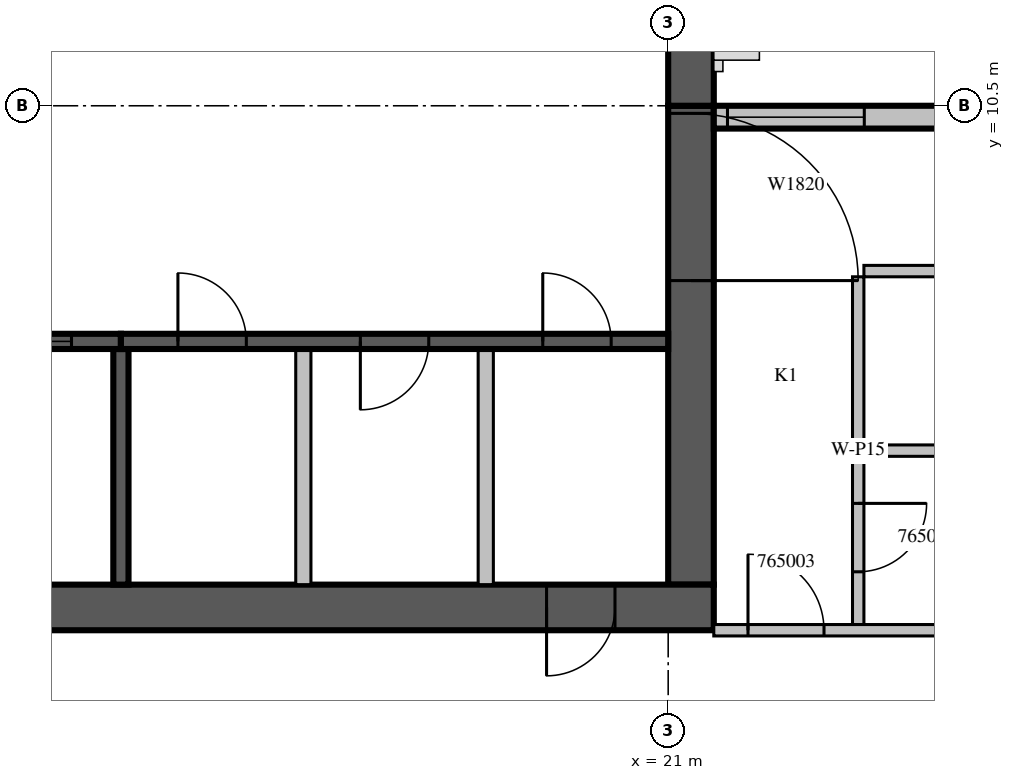
"""IFC4 building model, lengths in metres.
Left out: names, types, materials, properties, quantities, classifications, styles, units other than length and angle.
Written with IfcOpenShell. Run it as: python <this file> out.ifc"""

import sys

from ifc_helpers import new_model, si_unit, direction, frame, frame_2d, origin, place, context, subcontext, project, spatial, rectangle, extrude, source, transform, mapped, element, fill, save


model = new_model("IFC4")
c1 = context("Model", 3, precision=1e-05, world=origin(), true_north=direction((0.0, 1.0)))
c2 = subcontext(c1, "Body", "Model", "MODEL_VIEW")
j1 = project(units=[si_unit("LENGTHUNIT", "METRE"), si_unit("PLANEANGLEUNIT", "RADIAN")], contexts=[c1])
p1 = place(None, origin())
s1 = spatial("IfcSite", under=j1, at=p1, CompositionType="ELEMENT")
p2 = place(p1, origin())
s2 = spatial("IfcBuilding", under=s1, at=p2, CompositionType="ELEMENT")
p3 = place(p2, frame((0.0, 0.0, 288.0)))
s3 = spatial("IfcBuildingStorey", under=s2, at=p3, CompositionType="ELEMENT", Elevation=288.0)
m1 = source(origin(), c2, "Body", "SweptSolid", [
    extrude(rectangle(XDim=6.3, YDim=0.6, at=frame_2d((3.15, 0.0))), origin(), (0.0, 0.0, 1.0), 3.5),
])
p4 = place(p3, frame((21.3, 4.2, 0.0), z_axis=(0.0, 0.0, 1.0), x_axis=(0.0, 1.0, 0.0)))
e1 = element("IfcWall", 1, at=p4, inside=s3, PredefinedType="SHEAR", context=c2, shape_type="MappedRepresentation", body=[
    mapped(m1, transform((0.0, 0.0, 0.0), scale=1.0)),
])
m2 = source(origin(), c2, "Body", "SweptSolid", [
    extrude(rectangle(XDim=2.2, YDim=2.1, at=frame_2d((1.1, 1.05))), frame((0.0, 0.31, 0.0), z_axis=(0.0, -1.0, 0.0), x_axis=(1.0, 0.0, 0.0)), (0.0, 0.0, 1.0), 0.62),
])
p5 = place(p4, frame((4.0, 0.0, 0.0)))
e2 = element("IfcOpeningElement", 2, at=p5, cuts=e1, PredefinedType="OPENING", context=c2, shape_type="MappedRepresentation", body=[
    mapped(m2, transform((0.0, 0.0, 0.0), scale=1.0)),
])
m3 = source(origin(), c2, "Body", "SweptSolid", [
    extrude(rectangle(XDim=17.4, YDim=0.6, at=frame_2d((8.7, 0.0))), origin(), (0.0, 0.0, 1.0), 3.5),
])
p6 = place(p3, frame((4.2, 3.9, 0.0), z_axis=(0.0, 0.0, 1.0), x_axis=(1.0, 0.0, 0.0)))
e3 = element("IfcWall", 3, at=p6, inside=s3, PredefinedType="SHEAR", context=c2, shape_type="MappedRepresentation", body=[
    mapped(m3, transform((0.0, 0.0, 0.0), scale=1.0)),
])
m4 = source(origin(), c2, "Body", "SweptSolid", [
    extrude(rectangle(XDim=0.9, YDim=2.1, at=frame_2d((0.45, 1.05))), frame((0.0, 0.31, 0.0), z_axis=(0.0, -1.0, 0.0), x_axis=(1.0, 0.0, 0.0)), (0.0, 0.0, 1.0), 0.62),
])
p7 = place(p6, frame((15.2, 0.0, 0.0)))
e4 = element("IfcOpeningElement", 4, at=p7, cuts=e3, PredefinedType="OPENING", context=c2, shape_type="MappedRepresentation", body=[
    mapped(m4, transform((0.0, 0.0, 0.0), scale=1.0)),
])
m5 = source(origin(), c2, "Body", "SweptSolid", [
    extrude(rectangle(XDim=10.5, YDim=0.6, at=frame_2d((5.25, 0.0))), origin(), (0.0, 0.0, 1.0), 3.5),
])
p8 = place(p3, frame((21.3, 10.5, 0.0), z_axis=(0.0, 0.0, 1.0), x_axis=(0.0, 1.0, 0.0)))
e5 = element("IfcWall", 5, at=p8, inside=s3, PredefinedType="SHEAR", context=c2, shape_type="MappedRepresentation", body=[
    mapped(m5, transform((0.0, 0.0, 0.0), scale=1.0)),
])
m6 = source(origin(), c2, "Body", "SweptSolid", [
    extrude(rectangle(XDim=1.2, YDim=2.4, at=frame_2d((0.6, 1.2))), frame((0.0, 0.31, 0.0), z_axis=(0.0, -1.0, 0.0), x_axis=(1.0, 0.0, 0.0)), (0.0, 0.0, 1.0), 0.62),
])
p9 = place(p8, frame((5.7, 0.0, 0.6)))
e6 = element("IfcOpeningElement", 6, at=p9, cuts=e5, PredefinedType="OPENING", context=c2, shape_type="MappedRepresentation", body=[
    mapped(m6, transform((0.0, 0.0, 0.0), scale=1.0)),
])
m7 = source(origin(), c2, "Body", "SweptSolid", [
    extrude(rectangle(XDim=7.45, YDim=0.3, at=frame_2d((3.725, 0.0))), origin(), (0.0, 0.0, 1.0), 3.1),
])
p10 = place(p3, frame((29.05, 10.35, 0.0), z_axis=(0.0, 0.0, 1.0), x_axis=(-1.0, 0.0, 0.0)))
e7 = element("IfcWall", 7, at=p10, inside=s3, PredefinedType="STANDARD", context=c2, shape_type="MappedRepresentation", body=[
    mapped(m7, transform((0.0, 0.0, 0.0), scale=1.0)),
])
m8 = source(origin(), c2, "Body", "SweptSolid", [
    extrude(rectangle(XDim=3.0, YDim=2.0, at=frame_2d((1.5, 1.0))), frame((0.0, 0.16, 0.0), z_axis=(0.0, -1.0, 0.0), x_axis=(1.0, 0.0, 0.0)), (0.0, 0.0, 1.0), 0.32),
])
p11 = place(p10, frame((1.09, 0.0, 0.6)))
e8 = element("IfcOpeningElement", 8, at=p11, cuts=e7, PredefinedType="OPENING", context=c2, shape_type="MappedRepresentation", body=[
    mapped(m8, transform((0.0, 0.0, 0.0), scale=1.0)),
])
m9 = source(origin(), c2, "Body", "SweptSolid", [
    extrude(rectangle(XDim=1.8, YDim=2.0, at=frame_2d((0.9, 1.0))), frame((0.0, 0.16, 0.0), z_axis=(0.0, -1.0, 0.0), x_axis=(1.0, 0.0, 0.0)), (0.0, 0.0, 1.0), 0.32),
])
p12 = place(p10, frame((5.47, 0.0, 0.6)))
e9 = element("IfcOpeningElement", 9, at=p12, cuts=e7, PredefinedType="OPENING", context=c2, shape_type="MappedRepresentation", body=[
    mapped(m9, transform((0.0, 0.0, 0.0), scale=1.0)),
])
m10 = source(origin(), c2, "Body", "SweptSolid", [
    extrude(rectangle(XDim=3.1, YDim=0.2, at=frame_2d((1.55, 0.0))), origin(), (0.0, 0.0, 1.0), 3.1),
])
p13 = place(p3, frame((13.8, 4.2, 0.0), z_axis=(0.0, 0.0, 1.0), x_axis=(0.0, 1.0, 0.0)))
e10 = element("IfcWall", 10, at=p13, inside=s3, PredefinedType="SOLIDWALL", context=c2, shape_type="MappedRepresentation", body=[
    mapped(m10, transform((0.0, 0.0, 0.0), scale=1.0)),
])
p14 = place(p3, frame((16.2, 4.2, 0.0), z_axis=(0.0, 0.0, 1.0), x_axis=(0.0, 1.0, 0.0)))
e11 = element("IfcWall", 11, at=p14, inside=s3, PredefinedType="PARTITIONING", context=c2, shape_type="SweptSolid", body=[
    extrude(rectangle(XDim=3.1, YDim=0.2, at=frame_2d((1.55, 0.0))), origin(), (0.0, 0.0, 1.0), 3.1),
])
m11 = source(origin(), c2, "Body", "SweptSolid", [
    extrude(rectangle(XDim=3.1, YDim=0.2, at=frame_2d((1.55, 0.0))), origin(), (0.0, 0.0, 1.0), 3.1),
])
p15 = place(p3, frame((18.6, 4.2, 0.0), z_axis=(0.0, 0.0, 1.0), x_axis=(0.0, 1.0, 0.0)))
e12 = element("IfcWall", 12, at=p15, inside=s3, PredefinedType="PARTITIONING", context=c2, shape_type="MappedRepresentation", body=[
    mapped(m11, transform((0.0, 0.0, 0.0), scale=1.0)),
])
m12 = source(origin(), c2, "Body", "SweptSolid", [
    extrude(rectangle(XDim=9.6, YDim=0.2, at=frame_2d((4.8, 0.0))), origin(), (0.0, 0.0, 1.0), 3.5),
])
p16 = place(p3, frame((4.2, 7.4, 0.0), z_axis=(0.0, 0.0, 1.0), x_axis=(1.0, 0.0, 0.0)))
e13 = element("IfcWall", 13, at=p16, inside=s3, PredefinedType="SOLIDWALL", context=c2, shape_type="MappedRepresentation", body=[
    mapped(m12, transform((0.0, 0.0, 0.0), scale=1.0)),
])
m13 = source(origin(), c2, "Body", "SweptSolid", [
    extrude(rectangle(XDim=1.1, YDim=2.1, at=frame_2d((0.55, 1.05))), frame((0.0, 0.11, 0.0), z_axis=(0.0, -1.0, 0.0), x_axis=(1.0, 0.0, 0.0)), (0.0, 0.0, 1.0), 0.22),
])
p17 = place(p16, frame((0.65, 0.0, 0.0)))
e14 = element("IfcOpeningElement", 14, at=p17, cuts=e13, PredefinedType="OPENING", context=c2, shape_type="MappedRepresentation", body=[
    mapped(m13, transform((0.0, 0.0, 0.0), scale=1.0)),
])
p18 = place(p16, frame((3.05, 0.0, 0.0)))
e15 = element("IfcOpeningElement", 15, at=p18, cuts=e13, PredefinedType="OPENING", context=c2, shape_type="MappedRepresentation", body=[
    mapped(m13, transform((0.0, 0.0, 0.0), scale=1.0)),
])
p19 = place(p16, frame((5.45, 0.0, 0.0)))
e16 = element("IfcOpeningElement", 16, at=p19, cuts=e13, PredefinedType="OPENING", context=c2, shape_type="MappedRepresentation", body=[
    mapped(m13, transform((0.0, 0.0, 0.0), scale=1.0)),
])
p20 = place(p16, frame((7.85, 0.0, 0.0)))
e17 = element("IfcOpeningElement", 17, at=p20, cuts=e13, PredefinedType="OPENING", context=c2, shape_type="MappedRepresentation", body=[
    mapped(m13, transform((0.0, 0.0, 0.0), scale=1.0)),
])
m14 = source(origin(), c2, "Body", "SweptSolid", [
    extrude(rectangle(XDim=7.2, YDim=0.2, at=frame_2d((3.6, 0.0))), origin(), (0.0, 0.0, 1.0), 3.1),
])
p21 = place(p3, frame((13.8, 7.4, 0.0), z_axis=(0.0, 0.0, 1.0), x_axis=(1.0, 0.0, 0.0)))
e18 = element("IfcWall", 18, at=p21, inside=s3, PredefinedType="SOLIDWALL", context=c2, shape_type="MappedRepresentation", body=[
    mapped(m14, transform((0.0, 0.0, 0.0), scale=1.0)),
])
m15 = source(origin(), c2, "Body", "SweptSolid", [
    extrude(rectangle(XDim=0.9, YDim=2.1, at=frame_2d((0.45, 1.05))), frame((0.0, 0.11, 0.0), z_axis=(0.0, -1.0, 0.0), x_axis=(1.0, 0.0, 0.0)), (0.0, 0.0, 1.0), 0.22),
])
p22 = place(p21, frame((0.75, 0.0, 0.0)))
e19 = element("IfcOpeningElement", 19, at=p22, cuts=e18, PredefinedType="OPENING", context=c2, shape_type="MappedRepresentation", body=[
    mapped(m15, transform((0.0, 0.0, 0.0), scale=1.0)),
])
p23 = place(p21, frame((3.15, 0.0, 0.0)))
e20 = element("IfcOpeningElement", 20, at=p23, cuts=e18, PredefinedType="OPENING", context=c2, shape_type="MappedRepresentation", body=[
    mapped(m15, transform((0.0, 0.0, 0.0), scale=1.0)),
])
p24 = place(p21, frame((5.55, 0.0, 0.0)))
e21 = element("IfcOpeningElement", 21, at=p24, cuts=e18, PredefinedType="OPENING", context=c2, shape_type="MappedRepresentation", body=[
    mapped(m15, transform((0.0, 0.0, 0.0), scale=1.0)),
])
m16 = source(origin(), c2, "Body", "SweptSolid", [
    extrude(rectangle(XDim=4.575, YDim=0.15, at=frame_2d((2.288, 0.0))), origin(), (0.0, 0.0, 1.0), 3.1),
])
p25 = place(p3, frame((23.5, 8.25, 0.0), z_axis=(0.0, 0.0, 1.0), x_axis=(0.0, -1.0, 0.0)))
e22 = element("IfcWall", 22, at=p25, inside=s3, PredefinedType="PARTITIONING", context=c2, shape_type="MappedRepresentation", body=[
    mapped(m16, transform((0.0, 0.0, 0.0), scale=1.0)),
])
m17 = source(origin(), c2, "Body", "SweptSolid", [
    extrude(rectangle(XDim=0.9, YDim=2.1, at=frame_2d((0.45, 1.05))), frame((0.0, 0.085, 0.0), z_axis=(0.0, -1.0, 0.0), x_axis=(1.0, 0.0, 0.0)), (0.0, 0.0, 1.0), 0.17),
])
p26 = place(p25, frame((2.981, 0.0, 0.0)))
e23 = element("IfcOpeningElement", 23, at=p26, cuts=e22, PredefinedType="OPENING", context=c2, shape_type="MappedRepresentation", body=[
    mapped(m17, transform((0.0, 0.0, 0.0), scale=1.0)),
])
m18 = source(origin(), c2, "Body", "SweptSolid", [
    extrude(rectangle(XDim=5.75, YDim=0.15, at=frame_2d((2.875, 0.0))), origin(), (0.0, 0.0, 1.0), 3.1),
])
p27 = place(p3, frame((29.325, 8.325, 0.0), z_axis=(0.0, 0.0, 1.0), x_axis=(-1.0, 0.0, 0.0)))
e24 = element("IfcWall", 24, at=p27, inside=s3, PredefinedType="PARTITIONING", context=c2, shape_type="MappedRepresentation", body=[
    mapped(m18, transform((0.0, 0.0, 0.0), scale=1.0)),
])
m19 = source(origin(), c2, "Body", "SweptSolid", [
    extrude(rectangle(XDim=1.0, YDim=2.1, at=frame_2d((0.5, 1.05))), frame((0.0, 0.085, 0.0), z_axis=(0.0, -1.0, 0.0), x_axis=(1.0, 0.0, 0.0)), (0.0, 0.0, 1.0), 0.17),
])
p28 = place(p27, frame((2.375, 0.0, 0.0)))
e25 = element("IfcOpeningElement", 25, at=p28, cuts=e24, PredefinedType="OPENING", context=c2, shape_type="MappedRepresentation", body=[
    mapped(m19, transform((0.0, 0.0, 0.0), scale=1.0)),
])
p29 = place(p3, frame((29.325, 5.963, 0.0), z_axis=(0.0, 0.0, 1.0), x_axis=(-1.0, 0.0, 0.0)))
e26 = element("IfcWall", 26, at=p29, inside=s3, PredefinedType="PARTITIONING", context=c2, shape_type="MappedRepresentation", body=[
    mapped(m18, transform((0.0, 0.0, 0.0), scale=1.0)),
])
m20 = source(origin(), c2, "Body", "SweptSolid", [
    extrude(rectangle(XDim=7.725, YDim=0.15, at=frame_2d((3.862, 0.0))), origin(), (0.0, 0.0, 1.0), 3.1),
])
p30 = place(p3, frame((21.6, 3.6, 0.0), z_axis=(0.0, 0.0, 1.0), x_axis=(1.0, 0.0, 0.0)))
e27 = element("IfcWall", 27, at=p30, inside=s3, PredefinedType="PARTITIONING", context=c2, shape_type="MappedRepresentation", body=[
    mapped(m20, transform((0.0, 0.0, 0.0), scale=1.0)),
])
p31 = place(p30, frame((0.45, 0.0, 0.0)))
e28 = element("IfcOpeningElement", 28, at=p31, cuts=e27, PredefinedType="OPENING", context=c2, shape_type="MappedRepresentation", body=[
    mapped(m19, transform((0.0, 0.0, 0.0), scale=1.0)),
])
p32 = place(p30, frame((3.413, 0.0, 0.0)))
e29 = element("IfcOpeningElement", 29, at=p32, cuts=e27, PredefinedType="OPENING", context=c2, shape_type="MappedRepresentation", body=[
    mapped(m17, transform((0.0, 0.0, 0.0), scale=1.0)),
])
m21 = source(origin(), c2, "Body", "SweptSolid", [
    extrude(rectangle(XDim=1.8, YDim=2.0, at=frame_2d((0.9, 1.0))), frame((0.0, 0.03, 0.0), z_axis=(0.0, -1.0, 0.0), x_axis=(1.0, 0.0, 0.0)), (0.0, 0.0, 1.0), 0.06),
])
p33 = place(p12, origin())
e30 = element("IfcWindow", 30, at=p33, inside=s3, PartitioningType="SINGLE_PANEL", PredefinedType="WINDOW", context=c2, shape_type="MappedRepresentation", body=[
    mapped(m21, transform((0.0, 0.0, 0.0), scale=1.0)),
])
fill(e9, e30)
m22 = source(origin(), c2, "Body", "SweptSolid", [
    extrude(rectangle(XDim=1.1, YDim=2.1, at=frame_2d((0.55, 1.05))), frame((0.0, 0.025, 0.0), z_axis=(0.0, -1.0, 0.0), x_axis=(1.0, 0.0, 0.0)), (0.0, 0.0, 1.0), 0.05),
])
p34 = place(p20, origin())
e31 = element("IfcDoor", 31, at=p34, inside=s3, OperationType="SLIDING_TO_LEFT", PredefinedType="DOOR", context=c2, shape_type="MappedRepresentation", body=[
    mapped(m22, transform((0.0, 0.0, 0.0), scale=1.0)),
])
fill(e17, e31)
m23 = source(origin(), c2, "Body", "SweptSolid", [
    extrude(rectangle(XDim=0.9, YDim=2.1, at=frame_2d((0.45, 1.05))), frame((0.0, 0.025, 0.0), z_axis=(0.0, -1.0, 0.0), x_axis=(1.0, 0.0, 0.0)), (0.0, 0.0, 1.0), 0.05),
])
p35 = place(p22, origin())
e32 = element("IfcDoor", 32, at=p35, inside=s3, OperationType="SINGLE_SWING_LEFT", PredefinedType="DOOR", context=c2, shape_type="MappedRepresentation", body=[
    mapped(m23, transform((0.0, 0.0, 0.0), scale=1.0)),
])
fill(e19, e32)
p36 = place(p23, origin())
e33 = element("IfcDoor", 33, at=p36, inside=s3, OperationType="SINGLE_SWING_RIGHT", PredefinedType="DOOR", context=c2, shape_type="MappedRepresentation", body=[
    mapped(m23, transform((0.0, 0.0, 0.0), scale=1.0)),
])
fill(e20, e33)
p37 = place(p24, origin())
e34 = element("IfcDoor", 34, at=p37, inside=s3, OperationType="SINGLE_SWING_LEFT", PredefinedType="DOOR", context=c2, shape_type="MappedRepresentation", body=[
    mapped(m23, transform((0.0, 0.0, 0.0), scale=1.0)),
])
fill(e21, e34)
m24 = source(origin(), c2, "Body", "SweptSolid", [
    extrude(rectangle(XDim=2.2, YDim=2.1, at=frame_2d((1.1, 1.05))), frame((0.0, 0.025, 0.0), z_axis=(0.0, -1.0, 0.0), x_axis=(1.0, 0.0, 0.0)), (0.0, 0.0, 1.0), 0.05),
])
p38 = place(p5, origin())
e35 = element("IfcDoor", 35, at=p38, inside=s3, OperationType="DOUBLE_DOOR_SINGLE_SWING", PredefinedType="DOOR", context=c2, shape_type="MappedRepresentation", body=[
    mapped(m24, transform((0.0, 0.0, 0.0), scale=1.0)),
])
fill(e2, e35)
p39 = place(p7, origin())
e36 = element("IfcDoor", 36, at=p39, inside=s3, OperationType="SINGLE_SWING_RIGHT", PredefinedType="DOOR", context=c2, shape_type="MappedRepresentation", body=[
    mapped(m23, transform((0.0, 0.0, 0.0), scale=1.0)),
])
fill(e4, e36)
p40 = place(p26, origin())
e37 = element("IfcDoor", 37, at=p40, inside=s3, OperationType="SINGLE_SWING_LEFT", PredefinedType="DOOR", context=c2, shape_type="MappedRepresentation", body=[
    mapped(m23, transform((0.0, 0.0, 0.0), scale=1.0)),
])
fill(e23, e37)
m25 = source(origin(), c2, "Body", "SweptSolid", [
    extrude(rectangle(XDim=1.0, YDim=2.1, at=frame_2d((0.5, 1.05))), frame((0.0, 0.025, 0.0), z_axis=(0.0, -1.0, 0.0), x_axis=(1.0, 0.0, 0.0)), (0.0, 0.0, 1.0), 0.05),
])
p41 = place(p31, origin())
e38 = element("IfcDoor", 38, at=p41, inside=s3, OperationType="SINGLE_SWING_LEFT", PredefinedType="DOOR", context=c2, shape_type="MappedRepresentation", body=[
    mapped(m25, transform((0.0, 0.0, 0.0), scale=1.0)),
])
fill(e28, e38)
save(model, sys.argv[1])
